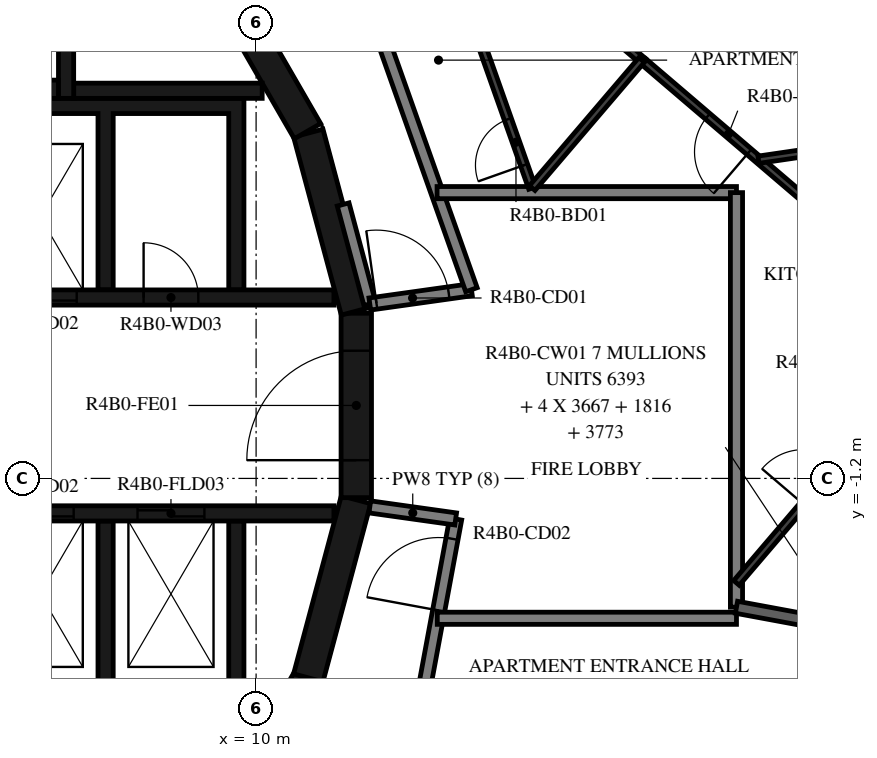
"""IFC4 building model, lengths in metres.
Left out: names, types, materials, properties, quantities, classifications, styles, units other than length and angle.
Written with IfcOpenShell. Run it as: python <this file> out.ifc"""

import sys

from ifc_helpers import new_model, si_unit, direction, frame, frame_2d, origin, place, context, subcontext, project, spatial, polyline, rectangle, outline, extrude, element, fill, save


model = new_model("IFC4")
c1 = context("Model", 3, precision=1e-05, world=origin(), true_north=direction((0.0, 1.0)))
c2 = subcontext(c1, "Body", "Model", "MODEL_VIEW")
j1 = project(units=[si_unit("LENGTHUNIT", "METRE"), si_unit("PLANEANGLEUNIT", "RADIAN")], contexts=[c1])
p1 = place(None, origin())
s1 = spatial("IfcSite", under=j1, at=p1, CompositionType="ELEMENT")
p2 = place(p1, origin())
s2 = spatial("IfcBuilding", under=s1, at=p2, CompositionType="ELEMENT")
p3 = place(p2, frame((0.0, 0.0, 165.7)))
s3 = spatial("IfcBuildingStorey", under=s2, at=p3, CompositionType="ELEMENT", Elevation=165.7)
for number, where, z_axis, x_axis in (
    (1, (9.329, -7.137, 0.0), (0.0, 0.0, 1.0), (0.5, 0.866, 0.0)),
    (2, (10.858, -4.479, 0.0), (0.0, 0.0, 1.0), (0.259, 0.966, 0.0)),
):
    element("IfcWall", number, at=place(p3, frame(where, z_axis=z_axis, x_axis=x_axis)), inside=s3, PredefinedType="SHEAR", context=c2, shape_type="SweptSolid", body=[
        extrude(rectangle(XDim=3.033, YDim=0.5, at=frame_2d((1.516, 0.0))), origin(), (0.0, 0.0, 1.0), 3.12),
    ])
p4 = place(p3, frame((11.647, -1.516, 0.0), z_axis=(0.0, 0.0, 1.0), x_axis=(0.0, 1.0, 0.0)))
e3 = element("IfcWall", 3, at=p4, inside=s3, PredefinedType="SHEAR", context=c2, shape_type="SweptSolid", body=[
    extrude(rectangle(XDim=3.033, YDim=0.5, at=frame_2d((1.516, 0.0))), origin(), (0.0, 0.0, 1.0), 3.12),
])
p5 = place(p4, frame((0.616, 0.0, 0.0)))
e4 = element("IfcOpeningElement", 4, at=p5, cuts=e3, PredefinedType="OPENING", context=c2, shape_type="SweptSolid", body=[
    extrude(rectangle(XDim=1.8, YDim=2.1, at=frame_2d((0.9, 1.05))), frame((0.0, 0.26, 0.0), z_axis=(0.0, -1.0, 0.0), x_axis=(1.0, 0.0, 0.0)), (0.0, 0.0, 1.0), 0.52),
])
for number, where, z_axis, x_axis in (
    (5, (11.643, 1.55, 0.0), (0.0, 0.0, 1.0), (-0.259, 0.966, 0.0)),
    (6, (10.845, 4.51, 0.0), (0.0, 0.0, 1.0), (-0.5, 0.866, 0.0)),
):
    element("IfcWall", number, at=place(p3, frame(where, z_axis=z_axis, x_axis=x_axis)), inside=s3, PredefinedType="SHEAR", context=c2, shape_type="SweptSolid", body=[
        extrude(rectangle(XDim=3.033, YDim=0.5, at=frame_2d((1.516, 0.0))), origin(), (0.0, 0.0, 1.0), 3.12),
    ])
p6 = place(p3, frame((0.0, 5.2, 0.0), z_axis=(0.0, 0.0, 1.0), x_axis=(1.0, 0.0, 0.0)))
e7 = element("IfcWall", 7, at=p6, inside=s3, PredefinedType="SHEAR", context=c2, shape_type="SweptSolid", body=[
    extrude(rectangle(XDim=6.75, YDim=0.3, at=frame_2d((3.375, 0.0))), origin(), (0.0, 0.0, 1.0), 3.12),
])
p7 = place(p3, frame((6.875, 5.05, 0.0), z_axis=(0.0, 0.0, 1.0), x_axis=(0.0, 1.0, 0.0)))
e8 = element("IfcWall", 8, at=p7, inside=s3, PredefinedType="SHEAR", context=c2, shape_type="SweptSolid", body=[
    extrude(rectangle(XDim=3.92, YDim=0.25, at=frame_2d((1.96, 0.0))), origin(), (0.0, 0.0, 1.0), 3.12),
])
p8 = place(p7, frame((1.11, 0.0, 0.0)))
e9 = element("IfcOpeningElement", 9, at=p8, cuts=e8, PredefinedType="OPENING", context=c2, shape_type="SweptSolid", body=[
    extrude(rectangle(XDim=1.2, YDim=2.1, at=frame_2d((0.6, 1.05))), frame((0.0, 0.135, 0.0), z_axis=(0.0, -1.0, 0.0), x_axis=(1.0, 0.0, 0.0)), (0.0, 0.0, 1.0), 0.27),
])
p9 = place(p3, frame((7.0, 5.175, 0.0), z_axis=(0.0, 0.0, 1.0), x_axis=(1.0, 0.0, 0.0)))
e10 = element("IfcWall", 10, at=p9, inside=s3, PredefinedType="SHEAR", context=c2, shape_type="SweptSolid", body=[
    extrude(rectangle(XDim=3.1, YDim=0.25, at=frame_2d((1.55, 0.0))), origin(), (0.0, 0.0, 1.0), 3.12),
])
p10 = place(p3, origin())
e11 = element("IfcWall", 11, at=p10, inside=s3, PredefinedType="SHEAR", context=c2, shape_type="SweptSolid", body=[
    extrude(outline(polyline([(-9.55, 4.8), (-5.5, 4.8), (-5.5, 1.9), (-5.25, 1.9), (-5.25, 4.8), (-1.2, 4.8), (-1.2, 1.9), (-0.95, 1.9), (-0.95, 4.8), (0.95, 4.8), (0.95, 1.9), (1.2, 1.9), (1.2, 4.8), (3.1, 4.8), (3.1, 1.9), (3.35, 1.9), (3.35, 4.8), (5.25, 4.8), (5.25, 1.9), (5.5, 1.9), (5.5, 4.8), (7.4, 4.8), (7.4, 1.9), (7.65, 1.9), (7.65, 4.8), (9.55, 4.8), (9.55, 1.9), (9.8, 1.9), (9.8, 4.8), (9.8, 5.05), (-9.8, 5.05), (-9.8, 4.8), (-9.8, 1.9), (-9.55, 1.9), (-9.55, 4.8)])), origin(), (0.0, 0.0, 1.0), 3.12),
])
p11 = place(p3, origin())
e12 = element("IfcWall", 12, at=p11, inside=s3, PredefinedType="SHEAR", context=c2, shape_type="SweptSolid", body=[
    extrude(outline(polyline([(9.8, -5.05), (9.8, -4.8), (9.8, -1.9), (9.55, -1.9), (9.55, -4.8), (7.65, -4.8), (7.65, -1.9), (7.4, -1.9), (7.4, -4.8), (5.5, -4.8), (5.5, -1.9), (5.25, -1.9), (5.25, -4.8), (3.35, -4.8), (3.35, -1.9), (3.1, -1.9), (3.1, -4.8), (1.2, -4.8), (1.2, -1.9), (0.95, -1.9), (0.95, -4.8), (-5.25, -4.8), (-5.25, -1.9), (-5.5, -1.9), (-5.5, -4.8), (-7.4, -4.8), (-7.4, -1.9), (-7.65, -1.9), (-7.65, -4.8), (-9.55, -4.8), (-9.55, -1.9), (-9.8, -1.9), (-9.8, -4.8), (-9.8, -5.05), (9.8, -5.05)])), origin(), (0.0, 0.0, 1.0), 3.12),
])
p12 = place(p3, frame((3.35, 1.775, 0.0), z_axis=(0.0, 0.0, 1.0), x_axis=(1.0, 0.0, 0.0)))
e13 = element("IfcWall", 13, at=p12, inside=s3, PredefinedType="SHEAR", context=c2, shape_type="SweptSolid", body=[
    extrude(rectangle(XDim=7.93, YDim=0.25, at=frame_2d((3.965, 0.0))), origin(), (0.0, 0.0, 1.0), 3.12),
])
p13 = place(p12, frame((0.35, 0.0, 0.0)))
e14 = element("IfcOpeningElement", 14, at=p13, cuts=e13, PredefinedType="OPENING", context=c2, shape_type="SweptSolid", body=[
    extrude(rectangle(XDim=1.2, YDim=2.4, at=frame_2d((0.6, 1.2))), frame((0.0, 0.135, 0.0), z_axis=(0.0, -1.0, 0.0), x_axis=(1.0, 0.0, 0.0)), (0.0, 0.0, 1.0), 0.27),
])
p14 = place(p12, frame((2.5, 0.0, 0.0)))
e15 = element("IfcOpeningElement", 15, at=p14, cuts=e13, PredefinedType="OPENING", context=c2, shape_type="SweptSolid", body=[
    extrude(rectangle(XDim=1.2, YDim=2.4, at=frame_2d((0.6, 1.2))), frame((0.0, 0.135, 0.0), z_axis=(0.0, -1.0, 0.0), x_axis=(1.0, 0.0, 0.0)), (0.0, 0.0, 1.0), 0.27),
])
p15 = place(p12, frame((4.8, 0.0, 0.0)))
e16 = element("IfcOpeningElement", 16, at=p15, cuts=e13, PredefinedType="OPENING", context=c2, shape_type="SweptSolid", body=[
    extrude(rectangle(XDim=0.9, YDim=2.1, at=frame_2d((0.45, 1.05))), frame((0.0, 0.135, 0.0), z_axis=(0.0, -1.0, 0.0), x_axis=(1.0, 0.0, 0.0)), (0.0, 0.0, 1.0), 0.27),
])
p16 = place(p3, frame((3.35, -1.775, 0.0), z_axis=(0.0, 0.0, 1.0), x_axis=(1.0, 0.0, 0.0)))
e17 = element("IfcWall", 17, at=p16, inside=s3, PredefinedType="SHEAR", context=c2, shape_type="SweptSolid", body=[
    extrude(rectangle(XDim=7.93, YDim=0.25, at=frame_2d((3.965, 0.0))), origin(), (0.0, 0.0, 1.0), 3.12),
])
p17 = place(p16, frame((0.4, 0.0, 0.0)))
e18 = element("IfcOpeningElement", 18, at=p17, cuts=e17, PredefinedType="OPENING", context=c2, shape_type="SweptSolid", body=[
    extrude(rectangle(XDim=1.1, YDim=2.4, at=frame_2d((0.55, 1.2))), frame((0.0, 0.135, 0.0), z_axis=(0.0, -1.0, 0.0), x_axis=(1.0, 0.0, 0.0)), (0.0, 0.0, 1.0), 0.27),
])
p18 = place(p16, frame((2.55, 0.0, 0.0)))
e19 = element("IfcOpeningElement", 19, at=p18, cuts=e17, PredefinedType="OPENING", context=c2, shape_type="SweptSolid", body=[
    extrude(rectangle(XDim=1.1, YDim=2.4, at=frame_2d((0.55, 1.2))), frame((0.0, 0.135, 0.0), z_axis=(0.0, -1.0, 0.0), x_axis=(1.0, 0.0, 0.0)), (0.0, 0.0, 1.0), 0.27),
])
p19 = place(p16, frame((4.7, 0.0, 0.0)))
e20 = element("IfcOpeningElement", 20, at=p19, cuts=e17, PredefinedType="OPENING", context=c2, shape_type="SweptSolid", body=[
    extrude(rectangle(XDim=1.1, YDim=2.4, at=frame_2d((0.55, 1.2))), frame((0.0, 0.135, 0.0), z_axis=(0.0, -1.0, 0.0), x_axis=(1.0, 0.0, 0.0)), (0.0, 0.0, 1.0), 0.27),
])
p20 = place(p3, frame((11.87, 1.668, 0.0), z_axis=(0.0, 0.0, 1.0), x_axis=(-0.258836880648, 0.965921047093, 0.0)))
e21 = element("IfcWall", 21, at=p20, inside=s3, PredefinedType="STANDARD", context=c2, shape_type="SweptSolid", body=[
    extrude(rectangle(XDim=1.695, YDim=0.2, at=frame_2d((0.848, 0.0))), origin(), (0.0, 0.0, 1.0), 3.12),
])
p21 = place(p3, frame((11.87, 1.668, 0.0), z_axis=(0.0, 0.0, 1.0), x_axis=(0.990270910415, 0.139152879904, 0.0)))
e22 = element("IfcWall", 22, at=p21, inside=s3, PredefinedType="STANDARD", context=c2, shape_type="SweptSolid", body=[
    extrude(rectangle(XDim=1.688, YDim=0.2, at=frame_2d((0.844, 0.0))), origin(), (0.0, 0.0, 1.0), 3.12),
])
p22 = place(p21, frame((0.11, 0.0, 0.0)))
e23 = element("IfcOpeningElement", 23, at=p22, cuts=e22, PredefinedType="OPENING", context=c2, shape_type="SweptSolid", body=[
    extrude(rectangle(XDim=1.2, YDim=2.1, at=frame_2d((0.6, 1.05))), frame((0.0, 0.11, 0.0), z_axis=(0.0, -1.0, 0.0), x_axis=(1.0, 0.0, 0.0)), (0.0, 0.0, 1.0), 0.22),
])
p23 = place(p3, frame((13.542, 1.903, 0.0), z_axis=(0.0, 0.0, 1.0), x_axis=(-0.333808508206, 0.942640907159, 0.0)))
e24 = element("IfcWall", 24, at=p23, inside=s3, PredefinedType="STANDARD", context=c2, shape_type="SweptSolid", body=[
    extrude(rectangle(XDim=6.317, YDim=0.2, at=frame_2d((3.158, 0.0))), origin(), (0.0, 0.0, 1.0), 3.12),
])
p24 = place(p3, frame((12.521, -5.972, 0.0), z_axis=(0.0, 0.0, 1.0), x_axis=(0.182244189886, 0.983253301674, 0.0)))
e25 = element("IfcWall", 25, at=p24, inside=s3, PredefinedType="STANDARD", context=c2, shape_type="SweptSolid", body=[
    extrude(rectangle(XDim=4.176, YDim=0.2, at=frame_2d((2.088, 0.0))), origin(), (0.0, 0.0, 1.0), 3.12),
])
p25 = place(p24, frame((2.645, 0.0, 0.0)))
e26 = element("IfcOpeningElement", 26, at=p25, cuts=e25, PredefinedType="OPENING", context=c2, shape_type="SweptSolid", body=[
    extrude(rectangle(XDim=1.2, YDim=2.1, at=frame_2d((0.6, 1.05))), frame((0.0, 0.11, 0.0), z_axis=(0.0, -1.0, 0.0), x_axis=(1.0, 0.0, 0.0)), (0.0, 0.0, 1.0), 0.22),
])
p26 = place(p3, frame((13.282, -1.867, 0.0), z_axis=(0.0, 0.0, 1.0), x_axis=(-0.990265430288, 0.139191873241, 0.0)))
e27 = element("IfcWall", 27, at=p26, inside=s3, PredefinedType="STANDARD", context=c2, shape_type="SweptSolid", body=[
    extrude(rectangle(XDim=1.426, YDim=0.2, at=frame_2d((0.713, 0.0))), origin(), (0.0, 0.0, 1.0), 3.12),
])
p27 = place(p3, frame((17.9, 3.5, 0.0), z_axis=(0.0, 0.0, 1.0), x_axis=(-1.0, 0.0, 0.0)))
e28 = element("IfcWall", 28, at=p27, inside=s3, PredefinedType="STANDARD", context=c2, shape_type="SweptSolid", body=[
    extrude(rectangle(XDim=4.924, YDim=0.2, at=frame_2d((2.462, 0.0))), origin(), (0.0, 0.0, 1.0), 3.12),
])
p28 = place(p3, frame((17.9, -3.318, 0.0), z_axis=(0.0, 0.0, 1.0), x_axis=(0.0, 1.0, 0.0)))
e29 = element("IfcWall", 29, at=p28, inside=s3, PredefinedType="STANDARD", context=c2, shape_type="SweptSolid", body=[
    extrude(rectangle(XDim=6.818, YDim=0.2, at=frame_2d((3.409, 0.0))), origin(), (0.0, 0.0, 1.0), 3.12),
])
p29 = place(p3, frame((12.979, -3.5, 0.0), z_axis=(0.0, 0.0, 1.0), x_axis=(1.0, 0.0, 0.0)))
e30 = element("IfcWall", 30, at=p29, inside=s3, PredefinedType="STANDARD", context=c2, shape_type="SweptSolid", body=[
    extrude(rectangle(XDim=4.92, YDim=0.2, at=frame_2d((2.46, 0.0))), origin(), (0.0, 0.0, 1.0), 3.12),
])
p30 = place(p3, frame((17.9, -3.319, 0.0), z_axis=(0.0, 0.0, 1.0), x_axis=(0.983246950753, -0.182278451375, 0.0)))
e31 = element("IfcWall", 31, at=p30, inside=s3, PredefinedType="STANDARD", context=c2, shape_type="SweptSolid", body=[
    extrude(rectangle(XDim=1.386, YDim=0.2, at=frame_2d((0.693, 0.0))), origin(), (0.0, 0.0, 1.0), 3.12),
])
p31 = place(p3, frame((14.541, 3.575, 0.0), z_axis=(0.0, 0.0, 1.0), x_axis=(-0.333799280318, 0.942644174893, 0.0)))
e32 = element("IfcWall", 32, at=p31, inside=s3, PredefinedType="PARTITIONING", context=c2, shape_type="SweptSolid", body=[
    extrude(rectangle(XDim=5.477, YDim=0.12, at=frame_2d((2.738, 0.0))), origin(), (0.0, 0.0, 1.0), 3.12),
])
p32 = place(p31, frame((0.4, 0.0, 0.0)))
e33 = element("IfcOpeningElement", 33, at=p32, cuts=e32, PredefinedType="OPENING", context=c2, shape_type="SweptSolid", body=[
    extrude(rectangle(XDim=0.8, YDim=2.1, at=frame_2d((0.4, 1.05))), frame((0.0, 0.07, 0.0), z_axis=(0.0, -1.0, 0.0), x_axis=(1.0, 0.0, 0.0)), (0.0, 0.0, 1.0), 0.14),
])
p33 = place(p3, frame((12.734, 8.762, 0.0), z_axis=(0.0, 0.0, 1.0), x_axis=(0.760390484255, -0.649466174219, 0.0)))
e34 = element("IfcWall", 34, at=p33, inside=s3, PredefinedType="PARTITIONING", context=c2, shape_type="SweptSolid", body=[
    extrude(rectangle(XDim=4.783, YDim=0.12, at=frame_2d((2.391, 0.0))), origin(), (0.0, 0.0, 1.0), 3.12),
])
p34 = place(p3, frame((23.411, -0.357, 0.0), z_axis=(0.0, 0.0, 1.0), x_axis=(-0.76041871148, 0.649433124525, 0.0)))
e35 = element("IfcWall", 35, at=p34, inside=s3, PredefinedType="PARTITIONING", context=c2, shape_type="SweptSolid", body=[
    extrude(rectangle(XDim=9.259, YDim=0.12, at=frame_2d((4.629, 0.0))), origin(), (0.0, 0.0, 1.0), 3.12),
])
p35 = place(p34, frame((6.972, 0.0, 0.0)))
e36 = element("IfcOpeningElement", 36, at=p35, cuts=e35, PredefinedType="OPENING", context=c2, shape_type="SweptSolid", body=[
    extrude(rectangle(XDim=0.9, YDim=2.1, at=frame_2d((0.45, 1.05))), frame((0.0, 0.07, 0.0), z_axis=(0.0, -1.0, 0.0), x_axis=(1.0, 0.0, 0.0)), (0.0, 0.0, 1.0), 0.14),
])
p36 = place(p34, frame((0.2, 0.0, 0.0)))
e37 = element("IfcOpeningElement", 37, at=p36, cuts=e35, PredefinedType="OPENING", context=c2, shape_type="SweptSolid", body=[
    extrude(rectangle(XDim=0.9, YDim=2.1, at=frame_2d((0.45, 1.05))), frame((0.0, 0.07, 0.0), z_axis=(0.0, -1.0, 0.0), x_axis=(1.0, 0.0, 0.0)), (0.0, 0.0, 1.0), 0.14),
])
p37 = place(p3, frame((16.341, 5.682, 0.0), z_axis=(0.0, 0.0, 1.0), x_axis=(-0.64946993237, -0.76038727432, 0.0)))
e38 = element("IfcWall", 38, at=p37, inside=s3, PredefinedType="PARTITIONING", context=c2, shape_type="SweptSolid", body=[
    extrude(rectangle(XDim=2.771, YDim=0.12, at=frame_2d((1.386, 0.0))), origin(), (0.0, 0.0, 1.0), 3.12),
])
p38 = place(p3, frame((17.9, -2.918, 0.0), z_axis=(0.0, 0.0, 1.0), x_axis=(0.649469887983, 0.760387312232, 0.0)))
e39 = element("IfcWall", 39, at=p38, inside=s3, PredefinedType="PARTITIONING", context=c2, shape_type="SweptSolid", body=[
    extrude(rectangle(XDim=5.527, YDim=0.12, at=frame_2d((2.763, 0.0))), origin(), (0.0, 0.0, 1.0), 3.12),
])
p39 = place(p38, frame((1.7, 0.0, 0.0)))
e40 = element("IfcOpeningElement", 40, at=p39, cuts=e39, PredefinedType="OPENING", context=c2, shape_type="SweptSolid", body=[
    extrude(rectangle(XDim=0.9, YDim=2.1, at=frame_2d((0.45, 1.05))), frame((0.0, 0.07, 0.0), z_axis=(0.0, -1.0, 0.0), x_axis=(1.0, 0.0, 0.0)), (0.0, 0.0, 1.0), 0.14),
])
p40 = place(p3, frame((22.994, 4.734, 0.0), z_axis=(0.0, 0.0, 1.0), x_axis=(-0.989449286977, -0.144879634529, 0.0)))
e41 = element("IfcWall", 41, at=p40, inside=s3, PredefinedType="PARTITIONING", context=c2, shape_type="SweptSolid", body=[
    extrude(rectangle(XDim=4.782, YDim=0.12, at=frame_2d((2.391, 0.0))), origin(), (0.0, 0.0, 1.0), 3.12),
])
p41 = place(p40, frame((0.7, 0.0, 0.0)))
e42 = element("IfcOpeningElement", 42, at=p41, cuts=e41, PredefinedType="OPENING", context=c2, shape_type="SweptSolid", body=[
    extrude(rectangle(XDim=0.9, YDim=2.1, at=frame_2d((0.45, 1.05))), frame((0.0, 0.07, 0.0), z_axis=(0.0, -1.0, 0.0), x_axis=(1.0, 0.0, 0.0)), (0.0, 0.0, 1.0), 0.14),
])
p42 = place(p5, origin())
e43 = element("IfcDoor", 43, at=p42, inside=s3, OperationType="DOUBLE_DOOR_SINGLE_SWING", PredefinedType="DOOR", context=c2, shape_type="SweptSolid", body=[
    extrude(rectangle(XDim=1.8, YDim=2.1, at=frame_2d((0.9, 1.05))), frame((0.0, 0.025, 0.0), z_axis=(0.0, -1.0, 0.0), x_axis=(1.0, 0.0, 0.0)), (0.0, 0.0, 1.0), 0.05),
])
fill(e4, e43)
p43 = place(p14, origin())
e44 = element("IfcDoor", 44, at=p43, inside=s3, OperationType="DOUBLE_DOOR_SLIDING", PredefinedType="DOOR", context=c2, shape_type="SweptSolid", body=[
    extrude(rectangle(XDim=1.2, YDim=2.4, at=frame_2d((0.6, 1.2))), frame((0.0, 0.025, 0.0), z_axis=(0.0, -1.0, 0.0), x_axis=(1.0, 0.0, 0.0)), (0.0, 0.0, 1.0), 0.05),
])
fill(e15, e44)
p44 = place(p18, origin())
e45 = element("IfcDoor", 45, at=p44, inside=s3, OperationType="DOUBLE_DOOR_SLIDING", PredefinedType="DOOR", context=c2, shape_type="SweptSolid", body=[
    extrude(rectangle(XDim=1.1, YDim=2.4, at=frame_2d((0.55, 1.2))), frame((0.0, 0.025, 0.0), z_axis=(0.0, -1.0, 0.0), x_axis=(1.0, 0.0, 0.0)), (0.0, 0.0, 1.0), 0.05),
])
fill(e19, e45)
p45 = place(p19, origin())
e46 = element("IfcDoor", 46, at=p45, inside=s3, OperationType="DOUBLE_DOOR_SLIDING", PredefinedType="DOOR", context=c2, shape_type="SweptSolid", body=[
    extrude(rectangle(XDim=1.1, YDim=2.4, at=frame_2d((0.55, 1.2))), frame((0.0, 0.025, 0.0), z_axis=(0.0, -1.0, 0.0), x_axis=(1.0, 0.0, 0.0)), (0.0, 0.0, 1.0), 0.05),
])
fill(e20, e46)
p46 = place(p15, origin())
e47 = element("IfcDoor", 47, at=p46, inside=s3, OperationType="SINGLE_SWING_LEFT", PredefinedType="DOOR", context=c2, shape_type="SweptSolid", body=[
    extrude(rectangle(XDim=0.9, YDim=2.1, at=frame_2d((0.45, 1.05))), frame((0.0, 0.025, 0.0), z_axis=(0.0, -1.0, 0.0), x_axis=(1.0, 0.0, 0.0)), (0.0, 0.0, 1.0), 0.05),
])
fill(e16, e47)
p47 = place(p32, origin())
e48 = element("IfcDoor", 48, at=p47, inside=s3, OperationType="SINGLE_SWING_LEFT", PredefinedType="DOOR", context=c2, shape_type="SweptSolid", body=[
    extrude(rectangle(XDim=0.8, YDim=2.1, at=frame_2d((0.4, 1.05))), frame((0.0, 0.025, 0.0), z_axis=(0.0, -1.0, 0.0), x_axis=(1.0, 0.0, 0.0)), (0.0, 0.0, 1.0), 0.05),
])
fill(e33, e48)
p48 = place(p35, origin())
e49 = element("IfcDoor", 49, at=p48, inside=s3, OperationType="SINGLE_SWING_RIGHT", PredefinedType="DOOR", context=c2, shape_type="SweptSolid", body=[
    extrude(rectangle(XDim=0.9, YDim=2.1, at=frame_2d((0.45, 1.05))), frame((0.0, 0.025, 0.0), z_axis=(0.0, -1.0, 0.0), x_axis=(1.0, 0.0, 0.0)), (0.0, 0.0, 1.0), 0.05),
])
fill(e36, e49)
p49 = place(p22, origin())
e50 = element("IfcDoor", 50, at=p49, inside=s3, OperationType="DOUBLE_DOOR_SINGLE_SWING", PredefinedType="DOOR", context=c2, shape_type="SweptSolid", body=[
    extrude(rectangle(XDim=1.2, YDim=2.1, at=frame_2d((0.6, 1.05))), frame((0.0, 0.025, 0.0), z_axis=(0.0, -1.0, 0.0), x_axis=(1.0, 0.0, 0.0)), (0.0, 0.0, 1.0), 0.05),
])
fill(e23, e50)
p50 = place(p25, origin())
e51 = element("IfcDoor", 51, at=p50, inside=s3, OperationType="DOUBLE_DOOR_SINGLE_SWING", PredefinedType="DOOR", context=c2, shape_type="SweptSolid", body=[
    extrude(rectangle(XDim=1.2, YDim=2.1, at=frame_2d((0.6, 1.05))), frame((0.0, 0.025, 0.0), z_axis=(0.0, -1.0, 0.0), x_axis=(1.0, 0.0, 0.0)), (0.0, 0.0, 1.0), 0.05),
])
fill(e26, e51)
save(model, sys.argv[1])
